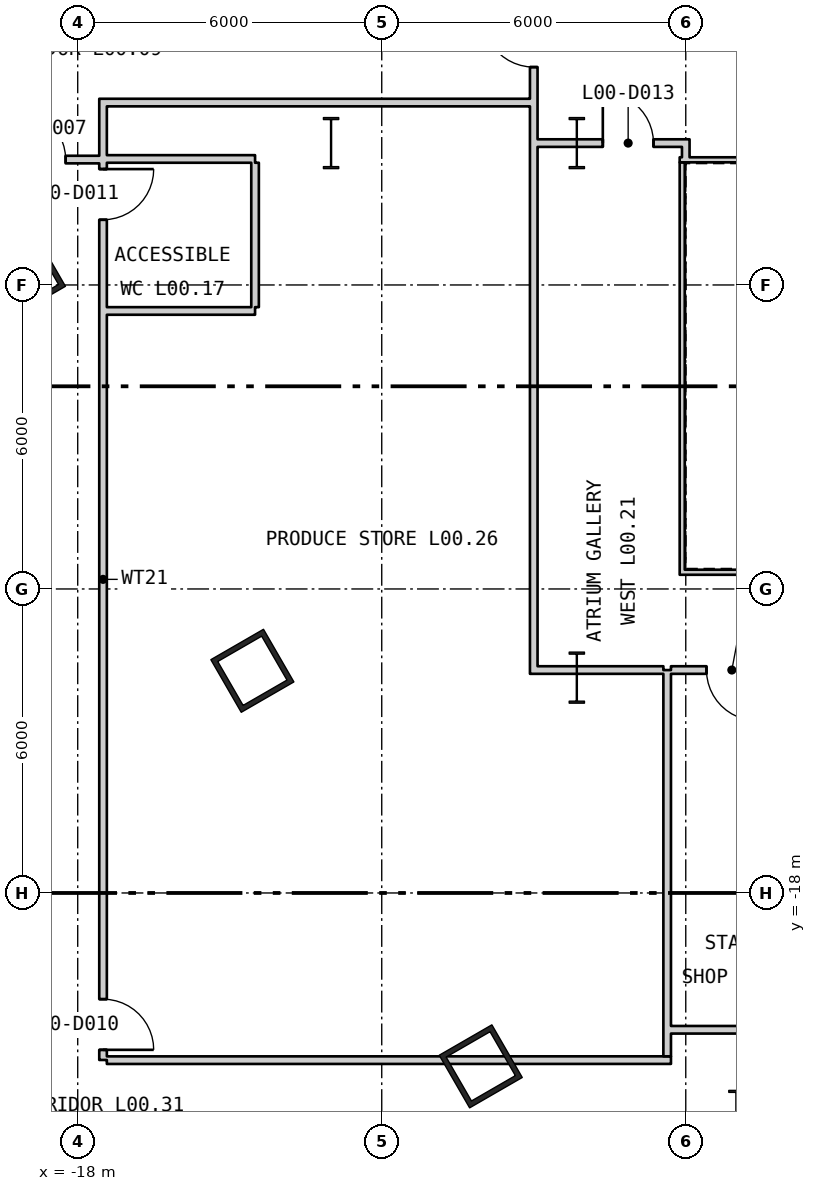
"""IFC4 building model, lengths in metres.
Left out: names, types, materials, properties, quantities, classifications, styles, units other than length and angle.
Written with IfcOpenShell. Run it as: python <this file> out.ifc"""

import sys

from ifc_helpers import new_model, si_unit, direction, frame, frame_2d, origin, origin_2d, place, context, subcontext, project, spatial, rectangle, hollow_rectangle, i_section, extrude, element, fill, save


model = new_model("IFC4")
c1 = context("Model", 3, precision=1e-05, world=origin(), true_north=direction((0.0, 1.0)))
c2 = subcontext(c1, "Body", "Model", "MODEL_VIEW")
j1 = project(units=[si_unit("LENGTHUNIT", "METRE"), si_unit("PLANEANGLEUNIT", "RADIAN")], contexts=[c1])
p1 = place(None, origin())
s1 = spatial("IfcSite", under=j1, at=p1, CompositionType="ELEMENT")
p2 = place(p1, origin())
s2 = spatial("IfcBuilding", under=s1, at=p2, CompositionType="ELEMENT")
p3 = place(p2, origin())
s3 = spatial("IfcBuildingStorey", under=s2, at=p3, CompositionType="ELEMENT", Elevation=0.0)
for number, where, z_axis, x_axis in (
    (1, (-19.061, -5.807, 0.0), (0.0, 0.0, 1.0), (0.5, -0.866, 0.0)),
    (2, (-14.553, -13.615, 0.0), (0.0, 0.0, 1.0), (0.5, -0.866, 0.0)),
    (3, (-10.046, -21.422, 0.0), (0.0, 0.0, 1.0), (0.5, -0.866, 0.0)),
):
    element("IfcColumn", number, at=place(p3, frame(where, z_axis=z_axis, x_axis=x_axis)), inside=s3, PredefinedType="COLUMN", context=c2, shape_type="SweptSolid", body=[
        extrude(hollow_rectangle(XDim=1.2, YDim=1.2, WallThickness=0.1, at=origin_2d()), origin(), (0.0, 0.0, 1.0), 8.4),
    ])
for number, where, z_axis, x_axis in (
    (4, (-8.15, -3.2, 0.0), (0.0, 0.0, 1.0), (1.0, 0.0, 0.0)),
    (5, (-8.15, -13.75, 0.0), (0.0, 0.0, 1.0), (1.0, 0.0, 0.0)),
    (6, (-5.0, -22.4, 0.0), (0.0, 0.0, 1.0), (1.0, 0.0, 0.0)),
    (7, (-13.0, -3.2, 0.0), (0.0, 0.0, 1.0), (1.0, 0.0, 0.0)),
):
    element("IfcColumn", number, at=place(p3, frame(where, z_axis=z_axis, x_axis=x_axis)), inside=s3, PredefinedType="COLUMN", context=c2, shape_type="SweptSolid", body=[
        extrude(i_section(OverallWidth=0.302, OverallDepth=1.008, WebThickness=0.021, FlangeThickness=0.04, at=origin_2d()), origin(), (0.0, 0.0, 1.0), 8.4),
    ])
for number, where, z_axis, x_axis in (
    (8, (-6.12, -11.67, 0.0), (0.0, 0.0, 1.0), (1.0, 0.0, 0.0)),
    (9, (6.12, -3.53, 0.0), (0.0, 0.0, 1.0), (-1.0, 0.0, 0.0)),
):
    element("IfcWall", number, at=place(p3, frame(where, z_axis=z_axis, x_axis=x_axis)), inside=s3, PredefinedType="PARTITIONING", context=c2, shape_type="SweptSolid", body=[
        extrude(rectangle(XDim=12.24, YDim=0.1, at=frame_2d((6.12, 0.0))), origin(), (0.0, 0.0, 1.0), 8.18),
    ])
p4 = place(p3, frame((-6.07, -3.58, 0.0), z_axis=(0.0, 0.0, 1.0), x_axis=(0.0, -1.0, 0.0)))
e10 = element("IfcWall", 10, at=p4, inside=s3, PredefinedType="PARTITIONING", context=c2, shape_type="SweptSolid", body=[
    extrude(rectangle(XDim=8.04, YDim=0.1, at=frame_2d((4.02, 0.0))), origin(), (0.0, 0.0, 1.0), 8.18),
])
p5 = place(p3, frame((-19.9, -3.525, 0.0), z_axis=(0.0, 0.0, 1.0), x_axis=(1.0, 0.0, 0.0)))
e11 = element("IfcWall", 11, at=p5, inside=s3, PredefinedType="PARTITIONING", context=c2, shape_type="SweptSolid", body=[
    extrude(rectangle(XDim=2.325, YDim=0.15, at=frame_2d((1.163, 0.0))), origin(), (0.0, 0.0, 1.0), 8.18),
])
p6 = place(p5, frame((0.662, 0.0, 0.0)))
e12 = element("IfcOpeningElement", 12, at=p6, cuts=e11, PredefinedType="OPENING", context=c2, shape_type="SweptSolid", body=[
    extrude(rectangle(XDim=1.0, YDim=2.1, at=frame_2d((0.5, 1.05))), frame((0.0, 0.085, 0.0), z_axis=(0.0, -1.0, 0.0), x_axis=(1.0, 0.0, 0.0)), (0.0, 0.0, 1.0), 0.17),
])
p7 = place(p3, frame((-17.5, -21.296, 0.0), z_axis=(0.0, 0.0, 1.0), x_axis=(0.0, 1.0, 0.0)))
e13 = element("IfcWall", 13, at=p7, inside=s3, PredefinedType="PARTITIONING", context=c2, shape_type="SweptSolid", body=[
    extrude(rectangle(XDim=18.971, YDim=0.15, at=frame_2d((9.486, 0.0))), origin(), (0.0, 0.0, 1.0), 8.18),
])
p8 = place(p7, frame((0.2, 0.0, 0.0)))
e14 = element("IfcOpeningElement", 14, at=p8, cuts=e13, PredefinedType="OPENING", context=c2, shape_type="SweptSolid", body=[
    extrude(rectangle(XDim=1.0, YDim=2.1, at=frame_2d((0.5, 1.05))), frame((0.0, 0.085, 0.0), z_axis=(0.0, -1.0, 0.0), x_axis=(1.0, 0.0, 0.0)), (0.0, 0.0, 1.0), 0.17),
])
p9 = place(p7, frame((16.583, 0.0, 0.0)))
e15 = element("IfcOpeningElement", 15, at=p9, cuts=e13, PredefinedType="OPENING", context=c2, shape_type="SweptSolid", body=[
    extrude(rectangle(XDim=1.0, YDim=2.1, at=frame_2d((0.5, 1.05))), frame((0.0, 0.085, 0.0), z_axis=(0.0, -1.0, 0.0), x_axis=(1.0, 0.0, 0.0)), (0.0, 0.0, 1.0), 0.17),
])
for number, where, z_axis, x_axis in (
    (16, (-17.425, -6.513, 0.0), (0.0, 0.0, 1.0), (1.0, 0.0, 0.0)),
    (17, (-17.425, -3.513, 0.0), (0.0, 0.0, 1.0), (1.0, 0.0, 0.0)),
):
    element("IfcWall", number, at=place(p3, frame(where, z_axis=z_axis, x_axis=x_axis)), inside=s3, PredefinedType="PARTITIONING", context=c2, shape_type="SweptSolid", body=[
        extrude(rectangle(XDim=2.925, YDim=0.15, at=frame_2d((1.462, 0.0))), origin(), (0.0, 0.0, 1.0), 8.18),
    ])
p10 = place(p3, frame((-17.425, -2.4, 0.0), z_axis=(0.0, 0.0, 1.0), x_axis=(1.0, 0.0, 0.0)))
e18 = element("IfcWall", 18, at=p10, inside=s3, PredefinedType="PARTITIONING", context=c2, shape_type="SweptSolid", body=[
    extrude(rectangle(XDim=8.35, YDim=0.15, at=frame_2d((4.175, 0.0))), origin(), (0.0, 0.0, 1.0), 8.18),
])
p11 = place(p3, frame((-17.425, -21.3, 0.0), z_axis=(0.0, 0.0, 1.0), x_axis=(0.999999995966, 8.9823048e-05, 0.0)))
e19 = element("IfcWall", 19, at=p11, inside=s3, PredefinedType="PARTITIONING", context=c2, shape_type="SweptSolid", body=[
    extrude(rectangle(XDim=11.133, YDim=0.15, at=frame_2d((5.566, 0.0))), origin(), (0.0, 0.0, 1.0), 8.18),
])
p12 = place(p3, frame((-14.5, -6.438, 0.0), z_axis=(0.0, 0.0, 1.0), x_axis=(0.0, 1.0, 0.0)))
e20 = element("IfcWall", 20, at=p12, inside=s3, PredefinedType="PARTITIONING", context=c2, shape_type="SweptSolid", body=[
    extrude(rectangle(XDim=2.85, YDim=0.15, at=frame_2d((1.425, 0.0))), origin(), (0.0, 0.0, 1.0), 8.18),
])
p13 = place(p3, frame((-9.0, -13.675, 0.0), z_axis=(0.0, 0.0, 1.0), x_axis=(0.0, 1.0, 0.0)))
e21 = element("IfcWall", 21, at=p13, inside=s3, PredefinedType="PARTITIONING", context=c2, shape_type="SweptSolid", body=[
    extrude(rectangle(XDim=13.675, YDim=0.15, at=frame_2d((6.838, 0.0))), origin(), (0.0, 0.0, 1.0), 8.18),
])
p14 = place(p13, frame((11.975, 0.0, 0.0)))
e22 = element("IfcOpeningElement", 22, at=p14, cuts=e21, PredefinedType="OPENING", context=c2, shape_type="SweptSolid", body=[
    extrude(rectangle(XDim=1.0, YDim=2.1, at=frame_2d((0.5, 1.05))), frame((0.0, 0.085, 0.0), z_axis=(0.0, -1.0, 0.0), x_axis=(1.0, 0.0, 0.0)), (0.0, 0.0, 1.0), 0.17),
])
p15 = place(p3, frame((-8.925, -13.6, 0.0), z_axis=(0.0, 0.0, 1.0), x_axis=(1.0, 0.0, 0.0)))
e23 = element("IfcWall", 23, at=p15, inside=s3, PredefinedType="PARTITIONING", context=c2, shape_type="SweptSolid", body=[
    extrude(rectangle(XDim=0.775, YDim=0.15, at=frame_2d((0.388, 0.0))), origin(), (0.0, 0.0, 1.0), 7.39),
])
p16 = place(p3, frame((-8.15, -13.6, 0.0), z_axis=(0.0, 0.0, 1.0), x_axis=(1.0, 0.0, 0.0)))
e24 = element("IfcWall", 24, at=p16, inside=s3, PredefinedType="PARTITIONING", context=c2, shape_type="SweptSolid", body=[
    extrude(rectangle(XDim=1.708, YDim=0.15, at=frame_2d((0.854, 0.0))), origin(), (0.0, 0.0, 1.0), 7.27),
])
p17 = place(p3, frame((-8.925, -3.2, 0.0), z_axis=(0.0, 0.0, 1.0), x_axis=(1.0, 0.0, 0.0)))
e25 = element("IfcWall", 25, at=p17, inside=s3, PredefinedType="PARTITIONING", context=c2, shape_type="SweptSolid", body=[
    extrude(rectangle(XDim=0.775, YDim=0.15, at=frame_2d((0.388, 0.0))), origin(), (0.0, 0.0, 1.0), 7.39),
])
p18 = place(p3, frame((-8.15, -3.2, 0.0), z_axis=(0.0, 0.0, 1.0), x_axis=(1.0, 0.0, 0.0)))
e26 = element("IfcWall", 26, at=p18, inside=s3, PredefinedType="PARTITIONING", context=c2, shape_type="SweptSolid", body=[
    extrude(rectangle(XDim=2.225, YDim=0.15, at=frame_2d((1.113, 0.0))), origin(), (0.0, 0.0, 1.0), 7.27),
])
p19 = place(p18, frame((0.513, 0.0, 0.0)))
e27 = element("IfcOpeningElement", 27, at=p19, cuts=e26, PredefinedType="OPENING", context=c2, shape_type="SweptSolid", body=[
    extrude(rectangle(XDim=1.0, YDim=2.1, at=frame_2d((0.5, 1.05))), frame((0.0, 0.085, 0.0), z_axis=(0.0, -1.0, 0.0), x_axis=(1.0, 0.0, 0.0)), (0.0, 0.0, 1.0), 0.17),
])
p20 = place(p3, frame((-6.367, -21.224, 0.0), z_axis=(0.0, 0.0, 1.0), x_axis=(0.0, 1.0, 0.0)))
e28 = element("IfcWall", 28, at=p20, inside=s3, PredefinedType="PARTITIONING", context=c2, shape_type="SweptSolid", body=[
    extrude(rectangle(XDim=7.623, YDim=0.15, at=frame_2d((3.812, 0.0))), origin(), (0.0, 0.0, 1.0), 7.58),
])
p21 = place(p3, frame((-6.292, -20.7, 0.0), z_axis=(0.0, 0.0, 1.0), x_axis=(1.0, 0.0, 0.0)))
e29 = element("IfcWall", 29, at=p21, inside=s3, PredefinedType="PARTITIONING", context=c2, shape_type="SweptSolid", body=[
    extrude(rectangle(XDim=2.922, YDim=0.15, at=frame_2d((1.461, 0.0))), origin(), (0.0, 0.0, 1.0), 8.18),
])
p22 = place(p3, frame((-6.292, -13.6, 0.0), z_axis=(0.0, 0.0, 1.0), x_axis=(1.0, 0.0, 0.0)))
e30 = element("IfcWall", 30, at=p22, inside=s3, PredefinedType="PARTITIONING", context=c2, shape_type="SweptSolid", body=[
    extrude(rectangle(XDim=2.122, YDim=0.15, at=frame_2d((1.061, 0.0))), origin(), (0.0, 0.0, 1.0), 7.27),
])
p23 = place(p22, frame((0.701, 0.0, 0.0)))
e31 = element("IfcOpeningElement", 31, at=p23, cuts=e30, PredefinedType="OPENING", context=c2, shape_type="SweptSolid", body=[
    extrude(rectangle(XDim=1.0, YDim=2.1, at=frame_2d((0.5, 1.05))), frame((0.0, 0.085, 0.0), z_axis=(0.0, -1.0, 0.0), x_axis=(1.0, 0.0, 0.0)), (0.0, 0.0, 1.0), 0.17),
])
p24 = place(p3, frame((-6.0, -3.48, 0.0), z_axis=(0.0, 0.0, 1.0), x_axis=(0.0, 1.0, 0.0)))
e32 = element("IfcWall", 32, at=p24, inside=s3, PredefinedType="PARTITIONING", context=c2, shape_type="SweptSolid", body=[
    extrude(rectangle(XDim=0.205, YDim=0.15, at=frame_2d((0.102, 0.0))), origin(), (0.0, 0.0, 1.0), 8.18),
])
p25 = place(p6, origin())
e33 = element("IfcDoor", 33, at=p25, inside=s3, OperationType="SINGLE_SWING_RIGHT", PredefinedType="DOOR", context=c2, shape_type="SweptSolid", body=[
    extrude(rectangle(XDim=1.0, YDim=2.1, at=frame_2d((0.5, 1.05))), frame((0.0, 0.025, 0.0), z_axis=(0.0, -1.0, 0.0), x_axis=(1.0, 0.0, 0.0)), (0.0, 0.0, 1.0), 0.05),
])
fill(e12, e33)
p26 = place(p8, origin())
e34 = element("IfcDoor", 34, at=p26, inside=s3, OperationType="SINGLE_SWING_LEFT", PredefinedType="DOOR", context=c2, shape_type="SweptSolid", body=[
    extrude(rectangle(XDim=1.0, YDim=2.1, at=frame_2d((0.5, 1.05))), frame((0.0, 0.025, 0.0), z_axis=(0.0, -1.0, 0.0), x_axis=(1.0, 0.0, 0.0)), (0.0, 0.0, 1.0), 0.05),
])
fill(e14, e34)
p27 = place(p9, origin())
e35 = element("IfcDoor", 35, at=p27, inside=s3, OperationType="SINGLE_SWING_RIGHT", PredefinedType="DOOR", context=c2, shape_type="SweptSolid", body=[
    extrude(rectangle(XDim=1.0, YDim=2.1, at=frame_2d((0.5, 1.05))), frame((0.0, 0.025, 0.0), z_axis=(0.0, -1.0, 0.0), x_axis=(1.0, 0.0, 0.0)), (0.0, 0.0, 1.0), 0.05),
])
fill(e15, e35)
p28 = place(p14, origin())
e36 = element("IfcDoor", 36, at=p28, inside=s3, OperationType="SINGLE_SWING_LEFT", PredefinedType="DOOR", context=c2, shape_type="SweptSolid", body=[
    extrude(rectangle(XDim=1.0, YDim=2.1, at=frame_2d((0.5, 1.05))), frame((0.0, 0.025, 0.0), z_axis=(0.0, -1.0, 0.0), x_axis=(1.0, 0.0, 0.0)), (0.0, 0.0, 1.0), 0.05),
])
fill(e22, e36)
p29 = place(p19, origin())
e37 = element("IfcDoor", 37, at=p29, inside=s3, OperationType="SINGLE_SWING_RIGHT", PredefinedType="DOOR", context=c2, shape_type="SweptSolid", body=[
    extrude(rectangle(XDim=1.0, YDim=2.1, at=frame_2d((0.5, 1.05))), frame((0.0, 0.025, 0.0), z_axis=(0.0, -1.0, 0.0), x_axis=(1.0, 0.0, 0.0)), (0.0, 0.0, 1.0), 0.05),
])
fill(e27, e37)
p30 = place(p23, origin())
e38 = element("IfcDoor", 38, at=p30, inside=s3, OperationType="SINGLE_SWING_RIGHT", PredefinedType="DOOR", context=c2, shape_type="SweptSolid", body=[
    extrude(rectangle(XDim=1.0, YDim=2.1, at=frame_2d((0.5, 1.05))), frame((0.0, 0.025, 0.0), z_axis=(0.0, -1.0, 0.0), x_axis=(1.0, 0.0, 0.0)), (0.0, 0.0, 1.0), 0.05),
])
fill(e31, e38)
save(model, sys.argv[1])
